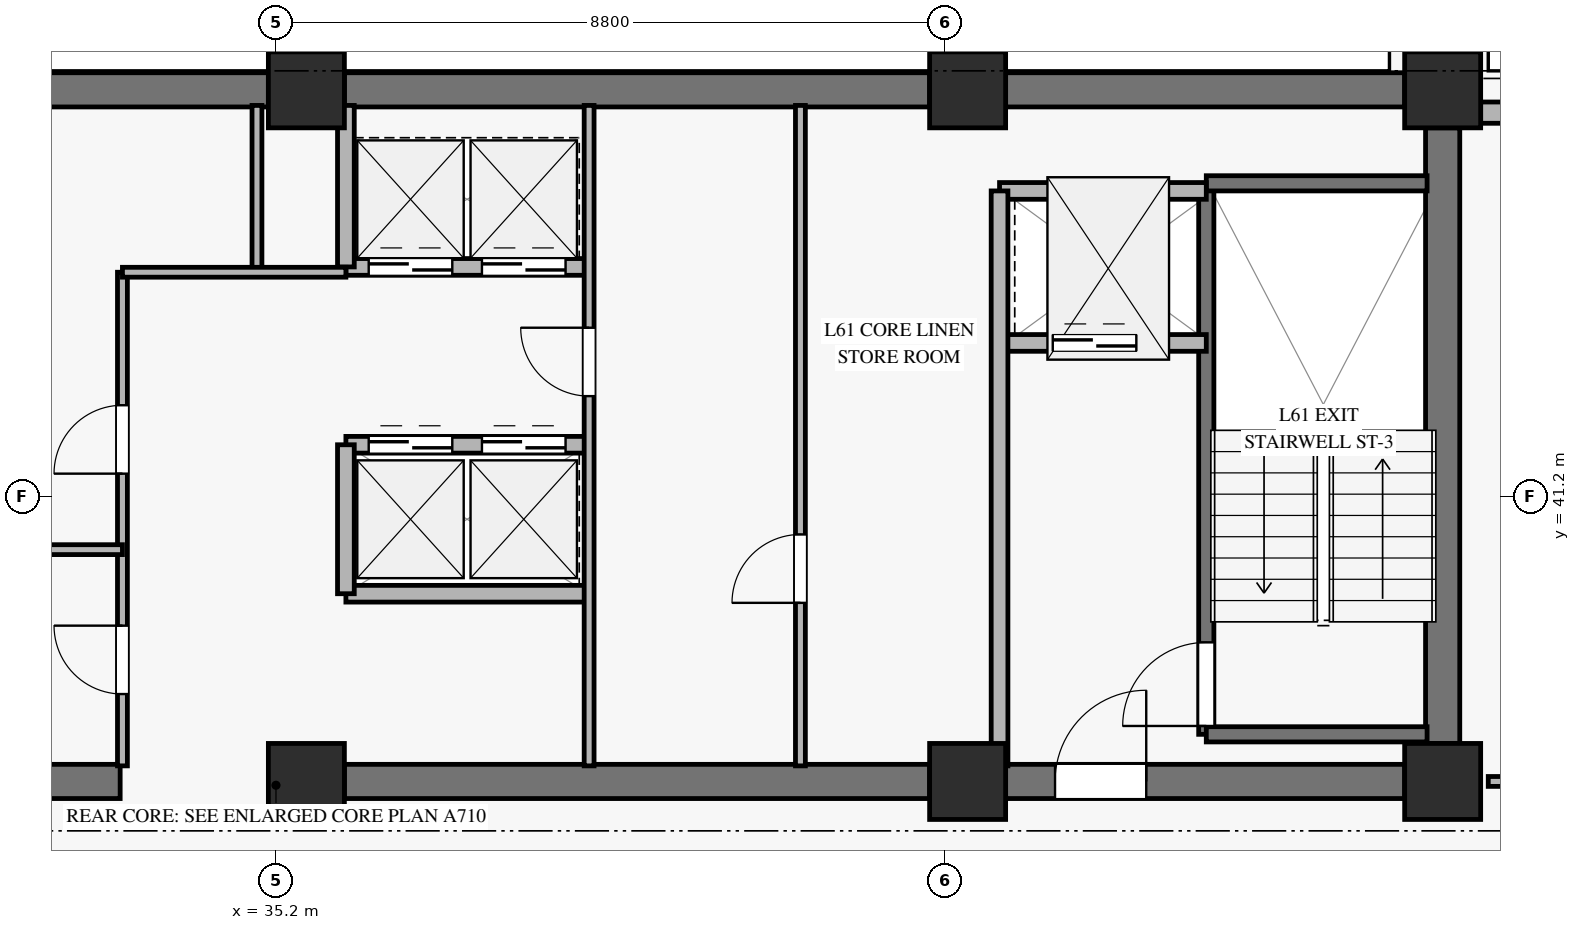
"""IFC4 building model, lengths in metres.
Left out: names, types, materials, properties, quantities, classifications, styles, units other than length and angle.
Written with IfcOpenShell. Run it as: python <this file> out.ifc"""

import sys

from ifc_helpers import new_model, si_unit, direction, frame, frame_2d, origin, origin_2d, place, context, subcontext, project, spatial, rectangle, extrude, source, transform, mapped, element, fill, save


model = new_model("IFC4")
c1 = context("Model", 3, precision=1e-05, world=origin(), true_north=direction((0.0, 1.0)))
c2 = subcontext(c1, "Body", "Model", "MODEL_VIEW")
j1 = project(units=[si_unit("LENGTHUNIT", "METRE"), si_unit("PLANEANGLEUNIT", "RADIAN")], contexts=[c1])
p1 = place(None, origin())
s1 = spatial("IfcSite", under=j1, at=p1, CompositionType="ELEMENT")
p2 = place(p1, origin())
s2 = spatial("IfcBuilding", under=s1, at=p2, CompositionType="ELEMENT")
p3 = place(p2, frame((0.0, 0.0, 241.7)))
s3 = spatial("IfcBuildingStorey", under=s2, at=p3, CompositionType="ELEMENT", Elevation=241.7)
m1 = source(origin(), c2, "Body", "SweptSolid", [
    extrude(rectangle(XDim=1.0, YDim=1.0, at=origin_2d()), origin(), (0.0, 0.0, 1.0), 3.185),
])
for number, where, z_axis, x_axis in (
    (1, (35.6, 37.45, 0.0), (0.0, 0.0, 1.0), (1.0, 0.0, 0.0)),
    (2, (35.6, 46.55, 0.0), (0.0, 0.0, 1.0), (1.0, 0.0, 0.0)),
    (3, (44.3, 37.45, 0.0), (0.0, 0.0, 1.0), (1.0, 0.0, 0.0)),
    (4, (44.3, 46.55, 0.0), (0.0, 0.0, 1.0), (1.0, 0.0, 0.0)),
    (5, (50.55, 37.45, 0.0), (0.0, 0.0, 1.0), (1.0, 0.0, 0.0)),
    (6, (50.55, 46.55, 0.0), (0.0, 0.0, 1.0), (1.0, 0.0, 0.0)),
):
    element("IfcColumn", number, at=place(p3, frame(where, z_axis=z_axis, x_axis=x_axis)), inside=s3, PredefinedType="PILASTER", context=c2, shape_type="MappedRepresentation", body=[
        mapped(m1, transform((0.0, 0.0, 0.0), x_axis=(1.0, 0.0, 0.0), y_axis=(0.0, 1.0, 0.0), z_axis=(0.0, 0.0, 1.0), scale=1.0)),
    ])
p4 = place(p3, frame((31.3, 46.55, 0.0), z_axis=(0.0, 0.0, 1.0), x_axis=(1.0, 0.0, 0.0)))
e7 = element("IfcWall", 7, at=p4, inside=s3, PredefinedType="SHEAR", context=c2, shape_type="SweptSolid", body=[
    extrude(rectangle(XDim=3.8, YDim=0.45, at=frame_2d((1.9, 0.0))), origin(), (0.0, 0.0, 1.0), 3.185),
])
p5 = place(p3, frame((36.1, 46.55, 0.0), z_axis=(0.0, 0.0, 1.0), x_axis=(1.0, 0.0, 0.0)))
e8 = element("IfcWall", 8, at=p5, inside=s3, PredefinedType="SHEAR", context=c2, shape_type="SweptSolid", body=[
    extrude(rectangle(XDim=7.7, YDim=0.45, at=frame_2d((3.85, 0.0))), origin(), (0.0, 0.0, 1.0), 3.185),
])
p6 = place(p3, frame((44.8, 46.55, 0.0), z_axis=(0.0, 0.0, 1.0), x_axis=(1.0, 0.0, 0.0)))
e9 = element("IfcWall", 9, at=p6, inside=s3, PredefinedType="SHEAR", context=c2, shape_type="SweptSolid", body=[
    extrude(rectangle(XDim=5.25, YDim=0.45, at=frame_2d((2.625, 0.0))), origin(), (0.0, 0.0, 1.0), 3.185),
])
p7 = place(p3, frame((31.3, 37.45, 0.0), z_axis=(0.0, 0.0, 1.0), x_axis=(1.0, 0.0, 0.0)))
e10 = element("IfcWall", 10, at=p7, inside=s3, PredefinedType="SHEAR", context=c2, shape_type="SweptSolid", body=[
    extrude(rectangle(XDim=1.85, YDim=0.45, at=frame_2d((0.925, 0.0))), origin(), (0.0, 0.0, 1.0), 3.185),
])
p8 = place(p3, frame((36.1, 37.45, 0.0), z_axis=(0.0, 0.0, 1.0), x_axis=(1.0, 0.0, 0.0)))
e11 = element("IfcWall", 11, at=p8, inside=s3, PredefinedType="SHEAR", context=c2, shape_type="SweptSolid", body=[
    extrude(rectangle(XDim=7.7, YDim=0.45, at=frame_2d((3.85, 0.0))), origin(), (0.0, 0.0, 1.0), 3.185),
])
p9 = place(p3, frame((44.8, 37.45, 0.0), z_axis=(0.0, 0.0, 1.0), x_axis=(1.0, 0.0, 0.0)))
e12 = element("IfcWall", 12, at=p9, inside=s3, PredefinedType="SHEAR", context=c2, shape_type="SweptSolid", body=[
    extrude(rectangle(XDim=5.25, YDim=0.45, at=frame_2d((2.625, 0.0))), origin(), (0.0, 0.0, 1.0), 3.185),
])
p10 = place(p9, frame((0.65, 0.0, 0.0)))
e13 = element("IfcOpeningElement", 13, at=p10, cuts=e12, PredefinedType="OPENING", context=c2, shape_type="SweptSolid", body=[
    extrude(rectangle(XDim=1.2, YDim=2.15, at=frame_2d((0.6, 1.075))), frame((0.0, 0.235, 0.0), z_axis=(0.0, -1.0, 0.0), x_axis=(1.0, 0.0, 0.0)), (0.0, 0.0, 1.0), 0.47),
])
p11 = place(p3, frame((50.55, 37.95, 0.0), z_axis=(0.0, 0.0, 1.0), x_axis=(0.0, 1.0, 0.0)))
e14 = element("IfcWall", 14, at=p11, inside=s3, PredefinedType="SHEAR", context=c2, shape_type="SweptSolid", body=[
    extrude(rectangle(XDim=8.1, YDim=0.45, at=frame_2d((4.05, 0.0))), origin(), (0.0, 0.0, 1.0), 3.185),
])
p12 = place(p3, frame((51.05, 46.25, 0.0), z_axis=(0.0, 0.0, 1.0), x_axis=(1.0, 0.0, 0.0)))
e15 = element("IfcWall", 15, at=p12, inside=s3, PredefinedType="SOLIDWALL", context=c2, shape_type="SweptSolid", body=[
    extrude(rectangle(XDim=8.491, YDim=0.28, at=frame_2d((4.246, 0.0))), origin(), (0.0, 0.0, 1.0), 2.815),
])
p13 = place(p12, frame((3.446, 0.0, 0.45)))
e16 = element("IfcOpeningElement", 16, at=p13, cuts=e15, PredefinedType="OPENING", context=c2, shape_type="SweptSolid", body=[
    extrude(rectangle(XDim=1.6, YDim=2.0, at=frame_2d((0.8, 1.0))), frame((0.0, 0.15, 0.0), z_axis=(0.0, -1.0, 0.0), x_axis=(1.0, 0.0, 0.0)), (0.0, 0.0, 1.0), 0.3),
])
p14 = place(p3, frame((47.44, 38.07, 0.0), z_axis=(0.0, 0.0, 1.0), x_axis=(0.0, 1.0, 0.0)))
e17 = element("IfcWall", 17, at=p14, inside=s3, PredefinedType="SOLIDWALL", context=c2, shape_type="SweptSolid", body=[
    extrude(rectangle(XDim=7.25, YDim=0.2, at=frame_2d((3.625, 0.0))), origin(), (0.0, 0.0, 1.0), 3.4),
])
p15 = place(p14, frame((0.11, 0.0, 0.0)))
e18 = element("IfcOpeningElement", 18, at=p15, cuts=e17, PredefinedType="OPENING", context=c2, shape_type="SweptSolid", body=[
    extrude(rectangle(XDim=1.1, YDim=2.15, at=frame_2d((0.55, 1.075))), frame((0.0, 0.11, 0.0), z_axis=(0.0, -1.0, 0.0), x_axis=(1.0, 0.0, 0.0)), (0.0, 0.0, 1.0), 0.22),
])
for number, where, z_axis, x_axis in (
    (19, (47.44, 45.32, 0.0), (0.0, 0.0, 1.0), (1.0, 0.0, 0.0)),
    (20, (47.44, 38.07, 0.0), (0.0, 0.0, 1.0), (1.0, 0.0, 0.0)),
):
    element("IfcWall", number, at=place(p3, frame(where, z_axis=z_axis, x_axis=x_axis)), inside=s3, PredefinedType="SOLIDWALL", context=c2, shape_type="SweptSolid", body=[
        extrude(rectangle(XDim=2.905, YDim=0.2, at=frame_2d((1.453, 0.0))), origin(), (0.0, 0.0, 1.0), 3.4),
    ])
p16 = place(p3, frame((44.72, 43.22, 0.0), z_axis=(0.0, 0.0, 1.0), x_axis=(1.0, 0.0, 0.0)))
e21 = element("IfcWall", 21, at=p16, inside=s3, PredefinedType="SOLIDWALL", context=c2, shape_type="SweptSolid", body=[
    extrude(rectangle(XDim=2.72, YDim=0.22, at=frame_2d((1.36, 0.0))), origin(), (0.0, 0.0, 1.0), 3.185),
])
p17 = place(p16, frame((0.7, 0.0, 0.0)))
e22 = element("IfcOpeningElement", 22, at=p17, cuts=e21, PredefinedType="OPENING", context=c2, shape_type="SweptSolid", body=[
    extrude(rectangle(XDim=1.1, YDim=2.2, at=frame_2d((0.55, 1.1))), frame((0.0, 0.12, 0.0), z_axis=(0.0, -1.0, 0.0), x_axis=(1.0, 0.0, 0.0)), (0.0, 0.0, 1.0), 0.24),
])
p18 = place(p3, frame((44.72, 45.22, 0.0), z_axis=(0.0, 0.0, 1.0), x_axis=(1.0, 0.0, 0.0)))
e23 = element("IfcWall", 23, at=p18, inside=s3, PredefinedType="SOLIDWALL", context=c2, shape_type="SweptSolid", body=[
    extrude(rectangle(XDim=2.72, YDim=0.22, at=frame_2d((1.36, 0.0))), origin(), (0.0, 0.0, 1.0), 3.185),
])
p19 = place(p3, frame((44.72, 37.655, 0.0), z_axis=(0.0, 0.0, 1.0), x_axis=(0.0, 1.0, 0.0)))
e24 = element("IfcWall", 24, at=p19, inside=s3, PredefinedType="SOLIDWALL", context=c2, shape_type="SweptSolid", body=[
    extrude(rectangle(XDim=7.565, YDim=0.22, at=frame_2d((3.782, 0.0))), origin(), (0.0, 0.0, 1.0), 3.185),
])
p20 = place(p3, frame((36.12, 44.22, 0.0), z_axis=(0.0, 0.0, 1.0), x_axis=(1.0, 0.0, 0.0)))
e25 = element("IfcWall", 25, at=p20, inside=s3, PredefinedType="SOLIDWALL", context=c2, shape_type="SweptSolid", body=[
    extrude(rectangle(XDim=3.2, YDim=0.22, at=frame_2d((1.6, 0.0))), origin(), (0.0, 0.0, 1.0), 3.185),
])
p21 = place(p20, frame((0.3, 0.0, 0.0)))
e26 = element("IfcOpeningElement", 26, at=p21, cuts=e25, PredefinedType="OPENING", context=c2, shape_type="SweptSolid", body=[
    extrude(rectangle(XDim=1.1, YDim=2.2, at=frame_2d((0.55, 1.1))), frame((0.0, 0.12, 0.0), z_axis=(0.0, -1.0, 0.0), x_axis=(1.0, 0.0, 0.0)), (0.0, 0.0, 1.0), 0.24),
])
p22 = place(p20, frame((1.79, 0.0, 0.0)))
e27 = element("IfcOpeningElement", 27, at=p22, cuts=e25, PredefinedType="OPENING", context=c2, shape_type="SweptSolid", body=[
    extrude(rectangle(XDim=1.1, YDim=2.2, at=frame_2d((0.55, 1.1))), frame((0.0, 0.12, 0.0), z_axis=(0.0, -1.0, 0.0), x_axis=(1.0, 0.0, 0.0)), (0.0, 0.0, 1.0), 0.24),
])
p23 = place(p3, frame((36.12, 41.88, 0.0), z_axis=(0.0, 0.0, 1.0), x_axis=(1.0, 0.0, 0.0)))
e28 = element("IfcWall", 28, at=p23, inside=s3, PredefinedType="SOLIDWALL", context=c2, shape_type="SweptSolid", body=[
    extrude(rectangle(XDim=3.2, YDim=0.22, at=frame_2d((1.6, 0.0))), origin(), (0.0, 0.0, 1.0), 3.185),
])
p24 = place(p23, frame((0.3, 0.0, 0.0)))
e29 = element("IfcOpeningElement", 29, at=p24, cuts=e28, PredefinedType="OPENING", context=c2, shape_type="SweptSolid", body=[
    extrude(rectangle(XDim=1.1, YDim=2.2, at=frame_2d((0.55, 1.1))), frame((0.0, 0.12, 0.0), z_axis=(0.0, -1.0, 0.0), x_axis=(1.0, 0.0, 0.0)), (0.0, 0.0, 1.0), 0.24),
])
p25 = place(p23, frame((1.79, 0.0, 0.0)))
e30 = element("IfcOpeningElement", 30, at=p25, cuts=e28, PredefinedType="OPENING", context=c2, shape_type="SweptSolid", body=[
    extrude(rectangle(XDim=1.1, YDim=2.2, at=frame_2d((0.55, 1.1))), frame((0.0, 0.12, 0.0), z_axis=(0.0, -1.0, 0.0), x_axis=(1.0, 0.0, 0.0)), (0.0, 0.0, 1.0), 0.24),
])
p26 = place(p3, frame((36.12, 39.92, 0.0), z_axis=(0.0, 0.0, 1.0), x_axis=(1.0, 0.0, 0.0)))
e31 = element("IfcWall", 31, at=p26, inside=s3, PredefinedType="SOLIDWALL", context=c2, shape_type="SweptSolid", body=[
    extrude(rectangle(XDim=3.2, YDim=0.22, at=frame_2d((1.6, 0.0))), origin(), (0.0, 0.0, 1.0), 3.185),
])
p27 = place(p3, frame((36.12, 39.92, 0.0), z_axis=(0.0, 0.0, 1.0), x_axis=(0.0, 1.0, 0.0)))
e32 = element("IfcWall", 32, at=p27, inside=s3, PredefinedType="SOLIDWALL", context=c2, shape_type="SweptSolid", body=[
    extrude(rectangle(XDim=1.96, YDim=0.22, at=frame_2d((0.98, 0.0))), origin(), (0.0, 0.0, 1.0), 3.185),
])
p28 = place(p3, frame((36.12, 44.22, 0.0), z_axis=(0.0, 0.0, 1.0), x_axis=(0.0, 1.0, 0.0)))
e33 = element("IfcWall", 33, at=p28, inside=s3, PredefinedType="SOLIDWALL", context=c2, shape_type="SweptSolid", body=[
    extrude(rectangle(XDim=2.125, YDim=0.22, at=frame_2d((1.062, 0.0))), origin(), (0.0, 0.0, 1.0), 3.185),
])
p29 = place(p3, frame((33.18, 37.655, 0.0), z_axis=(0.0, 0.0, 1.0), x_axis=(0.0, 1.0, 0.0)))
e34 = element("IfcWall", 34, at=p29, inside=s3, PredefinedType="PARTITIONING", context=c2, shape_type="SweptSolid", body=[
    extrude(rectangle(XDim=6.495, YDim=0.13, at=frame_2d((3.248, 0.0))), origin(), (0.0, 0.0, 1.0), 2.27),
])
p30 = place(p29, frame((0.945, 0.0, 0.0)))
e35 = element("IfcOpeningElement", 35, at=p30, cuts=e34, PredefinedType="OPENING", context=c2, shape_type="SweptSolid", body=[
    extrude(rectangle(XDim=0.9, YDim=2.1, at=frame_2d((0.45, 1.05))), frame((0.0, 0.075, 0.0), z_axis=(0.0, -1.0, 0.0), x_axis=(1.0, 0.0, 0.0)), (0.0, 0.0, 1.0), 0.15),
])
p31 = place(p29, frame((3.845, 0.0, 0.0)))
e36 = element("IfcOpeningElement", 36, at=p31, cuts=e34, PredefinedType="OPENING", context=c2, shape_type="SweptSolid", body=[
    extrude(rectangle(XDim=0.9, YDim=2.1, at=frame_2d((0.45, 1.05))), frame((0.0, 0.075, 0.0), z_axis=(0.0, -1.0, 0.0), x_axis=(1.0, 0.0, 0.0)), (0.0, 0.0, 1.0), 0.15),
])
p32 = place(p3, frame((34.95, 44.15, 0.0), z_axis=(0.0, 0.0, 1.0), x_axis=(0.0, 1.0, 0.0)))
e37 = element("IfcWall", 37, at=p32, inside=s3, PredefinedType="PARTITIONING", context=c2, shape_type="SweptSolid", body=[
    extrude(rectangle(XDim=2.195, YDim=0.13, at=frame_2d((1.098, 0.0))), origin(), (0.0, 0.0, 1.0), 3.185),
])
p33 = place(p3, frame((33.18, 44.15, 0.0), z_axis=(0.0, 0.0, 1.0), x_axis=(1.0, 0.0, 0.0)))
e38 = element("IfcWall", 38, at=p33, inside=s3, PredefinedType="PARTITIONING", context=c2, shape_type="SweptSolid", body=[
    extrude(rectangle(XDim=2.94, YDim=0.13, at=frame_2d((1.47, 0.0))), origin(), (0.0, 0.0, 1.0), 2.47),
])
p34 = place(p3, frame((39.32, 37.655, 0.0), z_axis=(0.0, 0.0, 1.0), x_axis=(0.0, 1.0, 0.0)))
e39 = element("IfcWall", 39, at=p34, inside=s3, PredefinedType="PARTITIONING", context=c2, shape_type="SweptSolid", body=[
    extrude(rectangle(XDim=8.69, YDim=0.13, at=frame_2d((4.345, 0.0))), origin(), (0.0, 0.0, 1.0), 3.185),
])
p35 = place(p34, frame((4.865, 0.0, 0.0)))
e40 = element("IfcOpeningElement", 40, at=p35, cuts=e39, PredefinedType="OPENING", context=c2, shape_type="SweptSolid", body=[
    extrude(rectangle(XDim=0.9, YDim=2.1, at=frame_2d((0.45, 1.05))), frame((0.0, 0.075, 0.0), z_axis=(0.0, -1.0, 0.0), x_axis=(1.0, 0.0, 0.0)), (0.0, 0.0, 1.0), 0.15),
])
p36 = place(p3, frame((30.22, 40.5, 0.0), z_axis=(0.0, 0.0, 1.0), x_axis=(1.0, 0.0, 0.0)))
e41 = element("IfcWall", 41, at=p36, inside=s3, PredefinedType="PARTITIONING", context=c2, shape_type="SweptSolid", body=[
    extrude(rectangle(XDim=2.96, YDim=0.13, at=frame_2d((1.48, 0.0))), origin(), (0.0, 0.0, 1.0), 2.47),
])
p37 = place(p3, frame((42.1, 37.655, 0.0), z_axis=(0.0, 0.0, 1.0), x_axis=(0.0, 1.0, 0.0)))
e42 = element("IfcWall", 42, at=p37, inside=s3, PredefinedType="PARTITIONING", context=c2, shape_type="SweptSolid", body=[
    extrude(rectangle(XDim=8.69, YDim=0.13, at=frame_2d((4.345, 0.0))), origin(), (0.0, 0.0, 1.0), 3.185),
])
p38 = place(p37, frame((2.145, 0.0, 0.0)))
e43 = element("IfcOpeningElement", 43, at=p38, cuts=e42, PredefinedType="OPENING", context=c2, shape_type="SweptSolid", body=[
    extrude(rectangle(XDim=0.9, YDim=2.1, at=frame_2d((0.45, 1.05))), frame((0.0, 0.075, 0.0), z_axis=(0.0, -1.0, 0.0), x_axis=(1.0, 0.0, 0.0)), (0.0, 0.0, 1.0), 0.15),
])
p39 = place(p3, frame((51.15, 37.45, 0.0), z_axis=(0.0, 0.0, 1.0), x_axis=(1.0, 0.0, 0.0)))
e44 = element("IfcWall", 44, at=p39, inside=s3, PredefinedType="PARTITIONING", context=c2, shape_type="SweptSolid", body=[
    extrude(rectangle(XDim=11.302, YDim=0.13, at=frame_2d((5.651, 0.0))), origin(), (0.0, 0.0, 1.0), 2.82),
])
p40 = place(p39, frame((0.5, 0.0, 0.0)))
e45 = element("IfcOpeningElement", 45, at=p40, cuts=e44, PredefinedType="OPENING", context=c2, shape_type="SweptSolid", body=[
    extrude(rectangle(XDim=0.9, YDim=2.1, at=frame_2d((0.45, 1.05))), frame((0.0, 0.075, 0.0), z_axis=(0.0, -1.0, 0.0), x_axis=(1.0, 0.0, 0.0)), (0.0, 0.0, 1.0), 0.15),
])
p41 = place(p39, frame((8.351, 0.0, 0.0)))
e46 = element("IfcOpeningElement", 46, at=p41, cuts=e44, PredefinedType="OPENING", context=c2, shape_type="SweptSolid", body=[
    extrude(rectangle(XDim=0.95, YDim=2.1, at=frame_2d((0.475, 1.05))), frame((0.0, 0.075, 0.0), z_axis=(0.0, -1.0, 0.0), x_axis=(1.0, 0.0, 0.0)), (0.0, 0.0, 1.0), 0.15),
])
m2 = source(origin(), c2, "Body", "SweptSolid", [
    extrude(rectangle(XDim=1.1, YDim=2.15, at=frame_2d((0.55, 1.075))), frame((0.0, 0.025, 0.0), z_axis=(0.0, -1.0, 0.0), x_axis=(1.0, 0.0, 0.0)), (0.0, 0.0, 1.0), 0.05),
])
p42 = place(p15, origin())
e47 = element("IfcDoor", 47, at=p42, inside=s3, OperationType="SINGLE_SWING_LEFT", PredefinedType="DOOR", context=c2, shape_type="MappedRepresentation", body=[
    mapped(m2, transform((0.0, 0.0, 0.0), x_axis=(1.0, 0.0, 0.0), y_axis=(0.0, 1.0, 0.0), z_axis=(0.0, 0.0, 1.0), scale=1.0)),
])
fill(e18, e47)
m3 = source(origin(), c2, "Body", "SweptSolid", [
    extrude(rectangle(XDim=1.1, YDim=2.2, at=frame_2d((0.55, 1.1))), frame((0.0, 0.025, 0.0), z_axis=(0.0, -1.0, 0.0), x_axis=(1.0, 0.0, 0.0)), (0.0, 0.0, 1.0), 0.05),
])
p43 = place(p17, origin())
e48 = element("IfcDoor", 48, at=p43, inside=s3, OperationType="SLIDING_TO_LEFT", PredefinedType="DOOR", context=c2, shape_type="MappedRepresentation", body=[
    mapped(m3, transform((0.0, 0.0, 0.0), x_axis=(1.0, 0.0, 0.0), y_axis=(0.0, 1.0, 0.0), z_axis=(0.0, 0.0, 1.0), scale=1.0)),
])
fill(e22, e48)
m4 = source(origin(), c2, "Body", "SweptSolid", [
    extrude(rectangle(XDim=1.2, YDim=2.15, at=frame_2d((0.6, 1.075))), frame((0.0, 0.025, 0.0), z_axis=(0.0, -1.0, 0.0), x_axis=(1.0, 0.0, 0.0)), (0.0, 0.0, 1.0), 0.05),
])
p44 = place(p10, origin())
e49 = element("IfcDoor", 49, at=p44, inside=s3, OperationType="SINGLE_SWING_RIGHT", PredefinedType="DOOR", context=c2, shape_type="MappedRepresentation", body=[
    mapped(m4, transform((0.0, 0.0, 0.0), x_axis=(1.0, 0.0, 0.0), y_axis=(0.0, 1.0, 0.0), z_axis=(0.0, 0.0, 1.0), scale=1.0)),
])
fill(e13, e49)
p45 = place(p21, origin())
e50 = element("IfcDoor", 50, at=p45, inside=s3, OperationType="SLIDING_TO_LEFT", PredefinedType="DOOR", context=c2, shape_type="MappedRepresentation", body=[
    mapped(m3, transform((0.0, 0.0, 0.0), x_axis=(1.0, 0.0, 0.0), y_axis=(0.0, 1.0, 0.0), z_axis=(0.0, 0.0, 1.0), scale=1.0)),
])
fill(e26, e50)
p46 = place(p22, origin())
e51 = element("IfcDoor", 51, at=p46, inside=s3, OperationType="SLIDING_TO_LEFT", PredefinedType="DOOR", context=c2, shape_type="MappedRepresentation", body=[
    mapped(m3, transform((0.0, 0.0, 0.0), x_axis=(1.0, 0.0, 0.0), y_axis=(0.0, 1.0, 0.0), z_axis=(0.0, 0.0, 1.0), scale=1.0)),
])
fill(e27, e51)
p47 = place(p24, origin())
e52 = element("IfcDoor", 52, at=p47, inside=s3, OperationType="SLIDING_TO_LEFT", PredefinedType="DOOR", context=c2, shape_type="MappedRepresentation", body=[
    mapped(m3, transform((0.0, 0.0, 0.0), x_axis=(1.0, 0.0, 0.0), y_axis=(0.0, 1.0, 0.0), z_axis=(0.0, 0.0, 1.0), scale=1.0)),
])
fill(e29, e52)
p48 = place(p25, origin())
e53 = element("IfcDoor", 53, at=p48, inside=s3, OperationType="SLIDING_TO_LEFT", PredefinedType="DOOR", context=c2, shape_type="MappedRepresentation", body=[
    mapped(m3, transform((0.0, 0.0, 0.0), x_axis=(1.0, 0.0, 0.0), y_axis=(0.0, 1.0, 0.0), z_axis=(0.0, 0.0, 1.0), scale=1.0)),
])
fill(e30, e53)
m5 = source(origin(), c2, "Body", "SweptSolid", [
    extrude(rectangle(XDim=0.9, YDim=2.1, at=frame_2d((0.45, 1.05))), frame((0.0, 0.025, 0.0), z_axis=(0.0, -1.0, 0.0), x_axis=(1.0, 0.0, 0.0)), (0.0, 0.0, 1.0), 0.05),
])
p49 = place(p30, origin())
e54 = element("IfcDoor", 54, at=p49, inside=s3, OperationType="SINGLE_SWING_RIGHT", PredefinedType="DOOR", context=c2, shape_type="MappedRepresentation", body=[
    mapped(m5, transform((0.0, 0.0, 0.0), x_axis=(1.0, 0.0, 0.0), y_axis=(0.0, 1.0, 0.0), z_axis=(0.0, 0.0, 1.0), scale=1.0)),
])
fill(e35, e54)
p50 = place(p31, origin())
e55 = element("IfcDoor", 55, at=p50, inside=s3, OperationType="SINGLE_SWING_LEFT", PredefinedType="DOOR", context=c2, shape_type="MappedRepresentation", body=[
    mapped(m5, transform((0.0, 0.0, 0.0), x_axis=(1.0, 0.0, 0.0), y_axis=(0.0, 1.0, 0.0), z_axis=(0.0, 0.0, 1.0), scale=1.0)),
])
fill(e36, e55)
p51 = place(p35, origin())
e56 = element("IfcDoor", 56, at=p51, inside=s3, OperationType="SINGLE_SWING_RIGHT", PredefinedType="DOOR", context=c2, shape_type="MappedRepresentation", body=[
    mapped(m5, transform((0.0, 0.0, 0.0), x_axis=(1.0, 0.0, 0.0), y_axis=(0.0, 1.0, 0.0), z_axis=(0.0, 0.0, 1.0), scale=1.0)),
])
fill(e40, e56)
p52 = place(p38, origin())
e57 = element("IfcDoor", 57, at=p52, inside=s3, OperationType="SINGLE_SWING_LEFT", PredefinedType="DOOR", context=c2, shape_type="MappedRepresentation", body=[
    mapped(m5, transform((0.0, 0.0, 0.0), x_axis=(1.0, 0.0, 0.0), y_axis=(0.0, 1.0, 0.0), z_axis=(0.0, 0.0, 1.0), scale=1.0)),
])
fill(e43, e57)
save(model, sys.argv[1])
